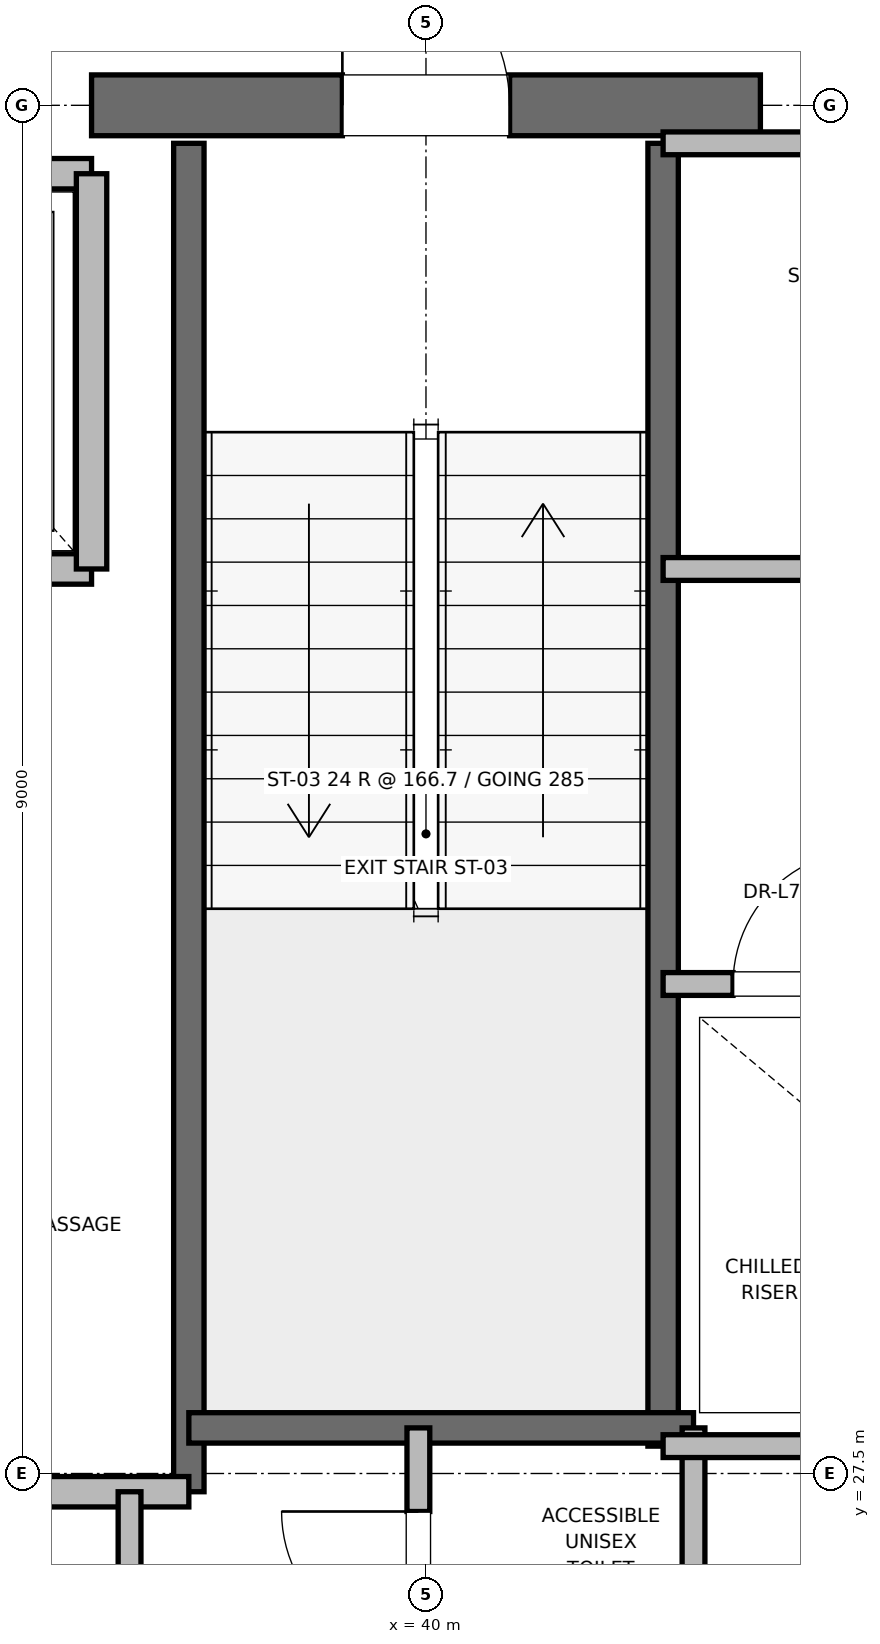
"""IFC4 building model, lengths in metres.
Left out: names, types, materials, properties, quantities, classifications, styles, units other than length and angle.
Written with IfcOpenShell. Run it as: python <this file> out.ifc"""

import sys

from ifc_helpers import new_model, si_unit, direction, frame, frame_2d, origin, place, context, subcontext, project, spatial, rectangle, extrude, element, fill, save


model = new_model("IFC4")
c1 = context("Model", 3, precision=1e-05, world=origin(), true_north=direction((0.0, 1.0)))
c2 = subcontext(c1, "Body", "Model", "MODEL_VIEW")
j1 = project(units=[si_unit("LENGTHUNIT", "METRE"), si_unit("PLANEANGLEUNIT", "RADIAN")], contexts=[c1])
p1 = place(None, origin())
s1 = spatial("IfcSite", under=j1, at=p1, CompositionType="ELEMENT")
p2 = place(p1, origin())
s2 = spatial("IfcBuilding", under=s1, at=p2, CompositionType="ELEMENT")
p3 = place(p2, frame((0.0, 0.0, 326.8)))
s3 = spatial("IfcBuildingStorey", under=s2, at=p3, CompositionType="ELEMENT", Elevation=326.8)
p4 = place(p3, frame((37.8, 36.5, 0.0), z_axis=(0.0, 0.0, 1.0), x_axis=(1.0, 0.0, 0.0)))
e1 = element("IfcWall", 1, at=p4, inside=s3, PredefinedType="SHEAR", context=c2, shape_type="SweptSolid", body=[
    extrude(rectangle(XDim=4.4, YDim=0.4, at=frame_2d((2.2, 0.0))), origin(), (0.0, 0.0, 1.0), 3.785),
])
p5 = place(p4, frame((1.65, 0.0, 0.0)))
e2 = element("IfcOpeningElement", 2, at=p5, cuts=e1, PredefinedType="OPENING", context=c2, shape_type="SweptSolid", body=[
    extrude(rectangle(XDim=1.1, YDim=2.15, at=frame_2d((0.55, 1.075))), frame((0.0, 0.2, 0.0), z_axis=(0.0, -1.0, 0.0), x_axis=(1.0, 0.0, 0.0)), (0.0, 0.0, 1.0), 0.4),
])
p6 = place(p3, frame((38.44, 27.38, 0.0), z_axis=(0.0, 0.0, 1.0), x_axis=(0.0, 1.0, 0.0)))
e3 = element("IfcWall", 3, at=p6, inside=s3, PredefinedType="SOLIDWALL", context=c2, shape_type="SweptSolid", body=[
    extrude(rectangle(XDim=8.87, YDim=0.2, at=frame_2d((4.435, 0.0))), origin(), (0.0, 0.0, 1.0), 3.785),
])
p7 = place(p3, frame((41.56, 27.68, 0.0), z_axis=(0.0, 0.0, 1.0), x_axis=(0.0, 1.0, 0.0)))
e4 = element("IfcWall", 4, at=p7, inside=s3, PredefinedType="SOLIDWALL", context=c2, shape_type="SweptSolid", body=[
    extrude(rectangle(XDim=8.57, YDim=0.2, at=frame_2d((4.285, 0.0))), origin(), (0.0, 0.0, 1.0), 3.785),
])
p8 = place(p3, frame((38.44, 27.8, 0.0), z_axis=(0.0, 0.0, 1.0), x_axis=(1.0, 0.0, 0.0)))
e5 = element("IfcWall", 5, at=p8, inside=s3, PredefinedType="SOLIDWALL", context=c2, shape_type="SweptSolid", body=[
    extrude(rectangle(XDim=3.32, YDim=0.2, at=frame_2d((1.66, 0.0))), origin(), (0.0, 0.0, 1.0), 3.785),
])
p9 = place(p3, frame((32.82, 27.38, 0.0), z_axis=(0.0, 0.0, 1.0), x_axis=(1.0, 0.0, 0.0)))
e6 = element("IfcWall", 6, at=p9, inside=s3, PredefinedType="PARTITIONING", context=c2, shape_type="SweptSolid", body=[
    extrude(rectangle(XDim=5.62, YDim=0.2, at=frame_2d((2.81, 0.0))), origin(), (0.0, 0.0, 1.0), 3.785),
])
p10 = place(p3, frame((35.5, 33.45, 0.0), z_axis=(0.0, 0.0, 1.0), x_axis=(1.0, 0.0, 0.0)))
e7 = element("IfcWall", 7, at=p10, inside=s3, PredefinedType="SOLIDWALL", context=c2, shape_type="SweptSolid", body=[
    extrude(rectangle(XDim=2.3, YDim=0.2, at=frame_2d((1.15, 0.0))), origin(), (0.0, 0.0, 1.0), 3.785),
])
p11 = place(p10, frame((0.6, 0.0, 0.0)))
e8 = element("IfcOpeningElement", 8, at=p11, cuts=e7, PredefinedType="OPENING", context=c2, shape_type="SweptSolid", body=[
    extrude(rectangle(XDim=1.1, YDim=2.2, at=frame_2d((0.55, 1.1))), frame((0.0, 0.1, 0.0), z_axis=(0.0, -1.0, 0.0), x_axis=(1.0, 0.0, 0.0)), (0.0, 0.0, 1.0), 0.2),
])
p12 = place(p3, frame((37.8, 36.05, 0.0), z_axis=(0.0, 0.0, 1.0), x_axis=(-1.0, 0.0, 0.0)))
e9 = element("IfcWall", 9, at=p12, inside=s3, PredefinedType="SOLIDWALL", context=c2, shape_type="SweptSolid", body=[
    extrude(rectangle(XDim=2.3, YDim=0.2, at=frame_2d((1.15, 0.0))), origin(), (0.0, 0.0, 1.0), 2.865),
])
p13 = place(p3, frame((37.8, 33.45, 0.0), z_axis=(0.0, 0.0, 1.0), x_axis=(0.0, 1.0, 0.0)))
e10 = element("IfcWall", 10, at=p13, inside=s3, PredefinedType="SOLIDWALL", context=c2, shape_type="SweptSolid", body=[
    extrude(rectangle(XDim=2.6, YDim=0.2, at=frame_2d((1.3, 0.0))), origin(), (0.0, 0.0, 1.0), 2.865),
])
p14 = place(p3, frame((41.76, 23.8, 0.0), z_axis=(0.0, 0.0, 1.0), x_axis=(0.0, 1.0, 0.0)))
e11 = element("IfcWall", 11, at=p14, inside=s3, PredefinedType="PARTITIONING", context=c2, shape_type="SweptSolid", body=[
    extrude(rectangle(XDim=4.0, YDim=0.15, at=frame_2d((2.0, 0.0))), origin(), (0.0, 0.0, 1.0), 2.85),
])
p15 = place(p3, frame((39.95, 25.8, 0.0), z_axis=(0.0, 0.0, 1.0), x_axis=(0.0, 1.0, 0.0)))
e12 = element("IfcWall", 12, at=p15, inside=s3, PredefinedType="PARTITIONING", context=c2, shape_type="SweptSolid", body=[
    extrude(rectangle(XDim=2.0, YDim=0.15, at=frame_2d((1.0, 0.0))), origin(), (0.0, 0.0, 1.0), 2.85),
])
p16 = place(p15, frame((0.55, 0.0, 0.0)))
e13 = element("IfcOpeningElement", 13, at=p16, cuts=e12, PredefinedType="OPENING", context=c2, shape_type="SweptSolid", body=[
    extrude(rectangle(XDim=0.9, YDim=2.1, at=frame_2d((0.45, 1.05))), frame((0.0, 0.075, 0.0), z_axis=(0.0, -1.0, 0.0), x_axis=(1.0, 0.0, 0.0)), (0.0, 0.0, 1.0), 0.15),
])
p17 = place(p3, frame((38.05, 23.06, 0.0), z_axis=(0.0, 0.0, 1.0), x_axis=(0.0, 1.0, 0.0)))
e14 = element("IfcWall", 14, at=p17, inside=s3, PredefinedType="PARTITIONING", context=c2, shape_type="SweptSolid", body=[
    extrude(rectangle(XDim=4.32, YDim=0.15, at=frame_2d((2.16, 0.0))), origin(), (0.0, 0.0, 1.0), 2.85),
])
p18 = place(p17, frame((1.66, 0.0, 0.0)))
e15 = element("IfcOpeningElement", 15, at=p18, cuts=e14, PredefinedType="OPENING", context=c2, shape_type="SweptSolid", body=[
    extrude(rectangle(XDim=1.0, YDim=2.15, at=frame_2d((0.5, 1.075))), frame((0.0, 0.075, 0.0), z_axis=(0.0, -1.0, 0.0), x_axis=(1.0, 0.0, 0.0)), (0.0, 0.0, 1.0), 0.15),
])
p19 = place(p3, frame((41.56, 27.68, 0.0), z_axis=(0.0, 0.0, 1.0), x_axis=(1.0, 0.0, 0.0)))
e16 = element("IfcWall", 16, at=p19, inside=s3, PredefinedType="PARTITIONING", context=c2, shape_type="SweptSolid", body=[
    extrude(rectangle(XDim=3.59, YDim=0.15, at=frame_2d((1.795, 0.0))), origin(), (0.0, 0.0, 1.0), 2.85),
])
p20 = place(p3, frame((41.56, 30.72, 0.0), z_axis=(0.0, 0.0, 1.0), x_axis=(1.0, 0.0, 0.0)))
e17 = element("IfcWall", 17, at=p20, inside=s3, PredefinedType="PARTITIONING", context=c2, shape_type="SweptSolid", body=[
    extrude(rectangle(XDim=1.8, YDim=0.15, at=frame_2d((0.9, 0.0))), origin(), (0.0, 0.0, 1.0), 2.85),
])
p21 = place(p20, frame((0.46, 0.0, 0.0)))
e18 = element("IfcOpeningElement", 18, at=p21, cuts=e17, PredefinedType="OPENING", context=c2, shape_type="SweptSolid", body=[
    extrude(rectangle(XDim=0.88, YDim=2.1, at=frame_2d((0.44, 1.05))), frame((0.0, 0.075, 0.0), z_axis=(0.0, -1.0, 0.0), x_axis=(1.0, 0.0, 0.0)), (0.0, 0.0, 1.0), 0.15),
])
p22 = place(p3, frame((41.56, 36.25, 0.0), z_axis=(0.0, 0.0, 1.0), x_axis=(1.0, 0.0, 0.0)))
e19 = element("IfcWall", 19, at=p22, inside=s3, PredefinedType="PARTITIONING", context=c2, shape_type="SweptSolid", body=[
    extrude(rectangle(XDim=2.94, YDim=0.15, at=frame_2d((1.47, 0.0))), origin(), (0.0, 0.0, 1.0), 2.85),
])
p23 = place(p3, frame((41.56, 33.45, 0.0), z_axis=(0.0, 0.0, 1.0), x_axis=(1.0, 0.0, 0.0)))
e20 = element("IfcWall", 20, at=p23, inside=s3, PredefinedType="PARTITIONING", context=c2, shape_type="SweptSolid", body=[
    extrude(rectangle(XDim=2.94, YDim=0.15, at=frame_2d((1.47, 0.0))), origin(), (0.0, 0.0, 1.0), 2.85),
])
p24 = place(p23, frame((1.03, 0.0, 0.0)))
e21 = element("IfcOpeningElement", 21, at=p24, cuts=e20, PredefinedType="OPENING", context=c2, shape_type="SweptSolid", body=[
    extrude(rectangle(XDim=0.88, YDim=2.1, at=frame_2d((0.44, 1.05))), frame((0.0, 0.075, 0.0), z_axis=(0.0, -1.0, 0.0), x_axis=(1.0, 0.0, 0.0)), (0.0, 0.0, 1.0), 0.15),
])
p25 = place(p5, origin())
e22 = element("IfcDoor", 22, at=p25, inside=s3, OperationType="SINGLE_SWING_LEFT", PredefinedType="DOOR", context=c2, shape_type="SweptSolid", body=[
    extrude(rectangle(XDim=1.1, YDim=2.15, at=frame_2d((0.55, 1.075))), frame((0.0, 0.025, 0.0), z_axis=(0.0, -1.0, 0.0), x_axis=(1.0, 0.0, 0.0)), (0.0, 0.0, 1.0), 0.05),
])
fill(e2, e22)
p26 = place(p16, origin())
e23 = element("IfcDoor", 23, at=p26, inside=s3, OperationType="SINGLE_SWING_RIGHT", PredefinedType="DOOR", context=c2, shape_type="SweptSolid", body=[
    extrude(rectangle(XDim=0.9, YDim=2.1, at=frame_2d((0.45, 1.05))), frame((0.0, 0.025, 0.0), z_axis=(0.0, -1.0, 0.0), x_axis=(1.0, 0.0, 0.0)), (0.0, 0.0, 1.0), 0.05),
])
fill(e13, e23)
p27 = place(p21, origin())
e24 = element("IfcDoor", 24, at=p27, inside=s3, OperationType="SINGLE_SWING_RIGHT", PredefinedType="DOOR", context=c2, shape_type="SweptSolid", body=[
    extrude(rectangle(XDim=0.88, YDim=2.1, at=frame_2d((0.44, 1.05))), frame((0.0, 0.025, 0.0), z_axis=(0.0, -1.0, 0.0), x_axis=(1.0, 0.0, 0.0)), (0.0, 0.0, 1.0), 0.05),
])
fill(e18, e24)
save(model, sys.argv[1])
